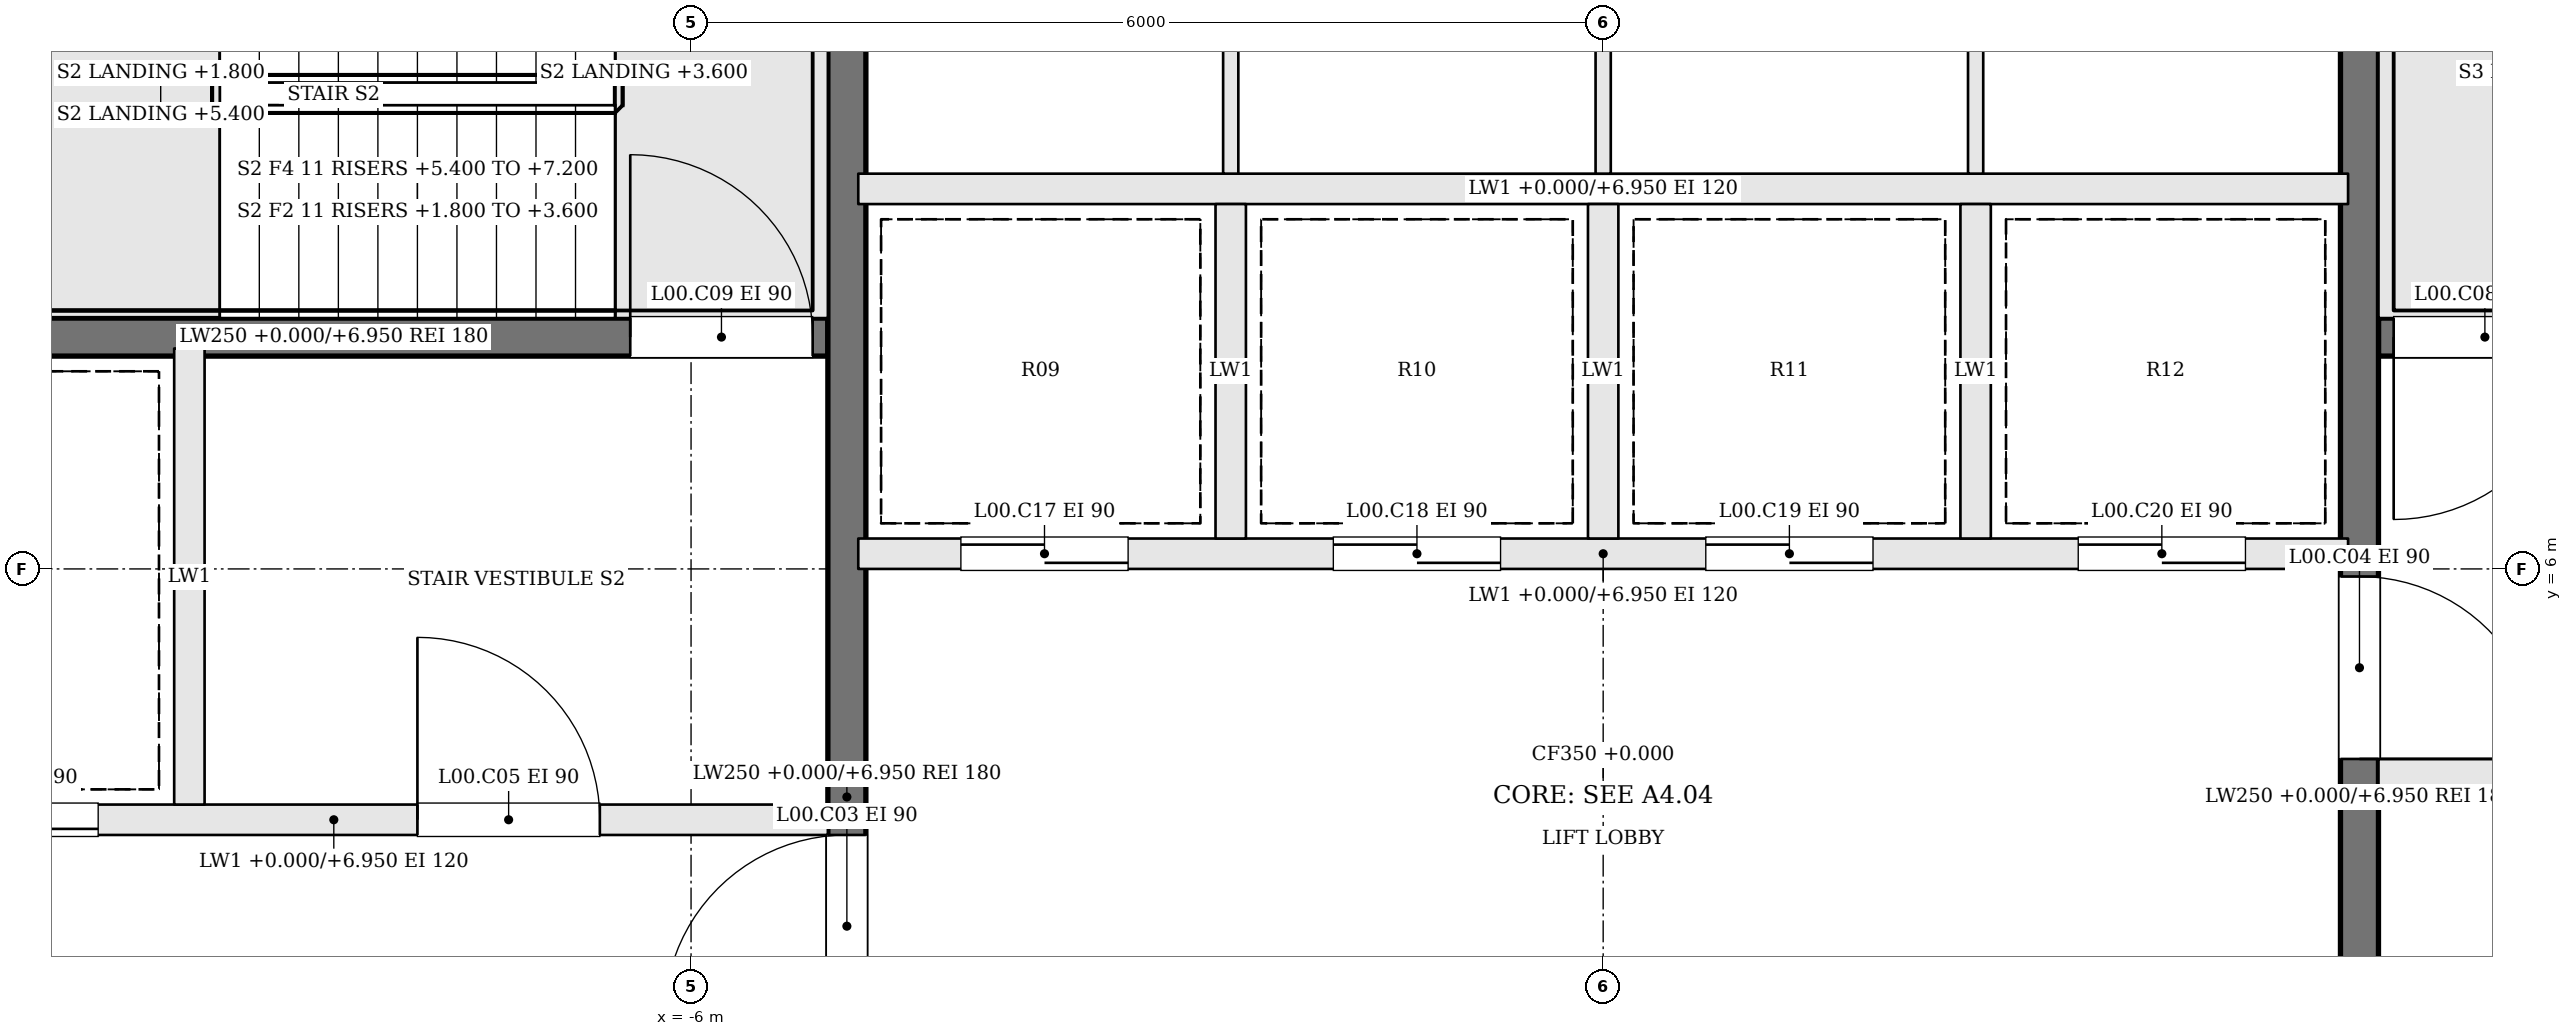
"""IFC4 building model, lengths in metres.
Left out: names, types, materials, properties, quantities, classifications, styles, units other than length and angle.
Written with IfcOpenShell. Run it as: python <this file> out.ifc"""

import sys

from ifc_helpers import new_model, si_unit, direction, frame, frame_2d, origin, place, context, subcontext, project, spatial, rectangle, extrude, element, fill, save


model = new_model("IFC4")
c1 = context("Model", 3, precision=1e-05, world=origin(), true_north=direction((0.0, 1.0)))
c2 = subcontext(c1, "Body", "Model", "MODEL_VIEW")
j1 = project(units=[si_unit("LENGTHUNIT", "METRE"), si_unit("PLANEANGLEUNIT", "RADIAN")], contexts=[c1])
p1 = place(None, origin())
s1 = spatial("IfcSite", under=j1, at=p1, CompositionType="ELEMENT")
p2 = place(p1, origin())
s2 = spatial("IfcBuilding", under=s1, at=p2, CompositionType="ELEMENT")
p3 = place(p2, origin())
s3 = spatial("IfcBuildingStorey", under=s2, at=p3, CompositionType="ELEMENT", Elevation=0.0)
p4 = place(p3, frame((11.6, 7.525, 0.0), z_axis=(0.0, 0.0, 1.0), x_axis=(-1.0, 0.0, 0.0)))
e1 = element("IfcWall", 1, at=p4, inside=s3, PredefinedType="SOLIDWALL", context=c2, shape_type="SweptSolid", body=[
    extrude(rectangle(XDim=6.5, YDim=0.25, at=frame_2d((3.25, 0.0))), origin(), (0.0, 0.0, 1.0), 6.95),
])
p5 = place(p4, frame((5.2, 0.0, 0.0)))
e2 = element("IfcOpeningElement", 2, at=p5, cuts=e1, PredefinedType="OPENING", context=c2, shape_type="SweptSolid", body=[
    extrude(rectangle(XDim=1.2, YDim=2.1, at=frame_2d((0.6, 1.05))), frame((0.0, 0.135, 0.0), z_axis=(0.0, -1.0, 0.0), x_axis=(1.0, 0.0, 0.0)), (0.0, 0.0, 1.0), 0.27),
])
p6 = place(p3, frame((-11.6, 4.35, 0.0), z_axis=(0.0, 0.0, 1.0), x_axis=(1.0, 0.0, 0.0)))
e3 = element("IfcWall", 3, at=p6, inside=s3, PredefinedType="SOLIDWALL", context=c2, shape_type="SweptSolid", body=[
    extrude(rectangle(XDim=6.5, YDim=0.2, at=frame_2d((3.25, 0.0))), origin(), (0.0, 0.0, 1.0), 6.95),
])
p7 = place(p6, frame((3.8, 0.0, 0.0)))
e4 = element("IfcOpeningElement", 4, at=p7, cuts=e3, PredefinedType="OPENING", context=c2, shape_type="SweptSolid", body=[
    extrude(rectangle(XDim=1.2, YDim=2.1, at=frame_2d((0.6, 1.05))), frame((0.0, 0.11, 0.0), z_axis=(0.0, -1.0, 0.0), x_axis=(1.0, 0.0, 0.0)), (0.0, 0.0, 1.0), 0.22),
])
p8 = place(p6, frame((0.5, 0.0, 0.0)))
e5 = element("IfcOpeningElement", 5, at=p8, cuts=e3, PredefinedType="OPENING", context=c2, shape_type="SweptSolid", body=[
    extrude(rectangle(XDim=1.2, YDim=2.1, at=frame_2d((0.6, 1.05))), frame((0.0, 0.11, 0.0), z_axis=(0.0, -1.0, 0.0), x_axis=(1.0, 0.0, 0.0)), (0.0, 0.0, 1.0), 0.22),
])
p9 = place(p3, frame((11.6, 4.65, 0.0), z_axis=(0.0, 0.0, 1.0), x_axis=(-1.0, 0.0, 0.0)))
e6 = element("IfcWall", 6, at=p9, inside=s3, PredefinedType="SOLIDWALL", context=c2, shape_type="SweptSolid", body=[
    extrude(rectangle(XDim=6.5, YDim=0.2, at=frame_2d((3.25, 0.0))), origin(), (0.0, 0.0, 1.0), 6.95),
])
p10 = place(p9, frame((3.8, 0.0, 0.0)))
e7 = element("IfcOpeningElement", 7, at=p10, cuts=e6, PredefinedType="OPENING", context=c2, shape_type="SweptSolid", body=[
    extrude(rectangle(XDim=1.2, YDim=2.1, at=frame_2d((0.6, 1.05))), frame((0.0, 0.11, 0.0), z_axis=(0.0, -1.0, 0.0), x_axis=(1.0, 0.0, 0.0)), (0.0, 0.0, 1.0), 0.22),
])
p11 = place(p9, frame((0.5, 0.0, 0.0)))
e8 = element("IfcOpeningElement", 8, at=p11, cuts=e6, PredefinedType="OPENING", context=c2, shape_type="SweptSolid", body=[
    extrude(rectangle(XDim=1.2, YDim=2.1, at=frame_2d((0.6, 1.05))), frame((0.0, 0.11, 0.0), z_axis=(0.0, -1.0, 0.0), x_axis=(1.0, 0.0, 0.0)), (0.0, 0.0, 1.0), 0.22),
])
p12 = place(p3, frame((-11.6, 7.525, 0.0), z_axis=(0.0, 0.0, 1.0), x_axis=(1.0, 0.0, 0.0)))
e9 = element("IfcWall", 9, at=p12, inside=s3, PredefinedType="SOLIDWALL", context=c2, shape_type="SweptSolid", body=[
    extrude(rectangle(XDim=6.5, YDim=0.25, at=frame_2d((3.25, 0.0))), origin(), (0.0, 0.0, 1.0), 6.95),
])
p13 = place(p12, frame((5.2, 0.0, 0.0)))
e10 = element("IfcOpeningElement", 10, at=p13, cuts=e9, PredefinedType="OPENING", context=c2, shape_type="SweptSolid", body=[
    extrude(rectangle(XDim=1.2, YDim=2.1, at=frame_2d((0.6, 1.05))), frame((0.0, 0.135, 0.0), z_axis=(0.0, -1.0, 0.0), x_axis=(1.0, 0.0, 0.0)), (0.0, 0.0, 1.0), 0.27),
])
p14 = place(p3, frame((-9.3, 4.45, 0.0), z_axis=(0.0, 0.0, 1.0), x_axis=(0.0, 1.0, 0.0)))
e11 = element("IfcWall", 11, at=p14, inside=s3, PredefinedType="SOLIDWALL", context=c2, shape_type="SweptSolid", body=[
    extrude(rectangle(XDim=3.0, YDim=0.2, at=frame_2d((1.5, 0.0))), origin(), (0.0, 0.0, 1.0), 6.95),
])
p15 = place(p3, frame((-4.975, -1.6, 0.0), z_axis=(0.0, 0.0, 1.0), x_axis=(0.0, 1.0, 0.0)))
e12 = element("IfcWall", 12, at=p15, inside=s3, PredefinedType="SOLIDWALL", context=c2, shape_type="SweptSolid", body=[
    extrude(rectangle(XDim=12.2, YDim=0.25, at=frame_2d((6.1, 0.0))), origin(), (0.0, 0.0, 1.0), 6.95),
])
p16 = place(p15, frame((4.65, 0.0, 0.0)))
e13 = element("IfcOpeningElement", 13, at=p16, cuts=e12, PredefinedType="OPENING", context=c2, shape_type="SweptSolid", body=[
    extrude(rectangle(XDim=1.2, YDim=2.1, at=frame_2d((0.6, 1.05))), frame((0.0, 0.135, 0.0), z_axis=(0.0, -1.0, 0.0), x_axis=(1.0, 0.0, 0.0)), (0.0, 0.0, 1.0), 0.27),
])
p17 = place(p3, frame((4.975, 10.6, 0.0), z_axis=(0.0, 0.0, 1.0), x_axis=(0.0, -1.0, 0.0)))
e14 = element("IfcWall", 14, at=p17, inside=s3, PredefinedType="SOLIDWALL", context=c2, shape_type="SweptSolid", body=[
    extrude(rectangle(XDim=12.2, YDim=0.25, at=frame_2d((6.1, 0.0))), origin(), (0.0, 0.0, 1.0), 6.95),
])
p18 = place(p17, frame((4.65, 0.0, 0.0)))
e15 = element("IfcOpeningElement", 15, at=p18, cuts=e14, PredefinedType="OPENING", context=c2, shape_type="SweptSolid", body=[
    extrude(rectangle(XDim=1.2, YDim=2.1, at=frame_2d((0.6, 1.05))), frame((0.0, 0.135, 0.0), z_axis=(0.0, -1.0, 0.0), x_axis=(1.0, 0.0, 0.0)), (0.0, 0.0, 1.0), 0.27),
])
p19 = place(p3, frame((-4.9, 6.1, 0.0), z_axis=(0.0, 0.0, 1.0), x_axis=(1.0, 0.0, 0.0)))
e16 = element("IfcWall", 16, at=p19, inside=s3, PredefinedType="SOLIDWALL", context=c2, shape_type="SweptSolid", body=[
    extrude(rectangle(XDim=9.8, YDim=0.2, at=frame_2d((4.9, 0.0))), origin(), (0.0, 0.0, 1.0), 6.95),
])
p20 = place(p19, frame((0.675, 0.0, 0.0)))
e17 = element("IfcOpeningElement", 17, at=p20, cuts=e16, PredefinedType="OPENING", context=c2, shape_type="SweptSolid", body=[
    extrude(rectangle(XDim=1.1, YDim=2.1, at=frame_2d((0.55, 1.05))), frame((0.0, 0.11, 0.0), z_axis=(0.0, -1.0, 0.0), x_axis=(1.0, 0.0, 0.0)), (0.0, 0.0, 1.0), 0.22),
])
p21 = place(p19, frame((3.125, 0.0, 0.0)))
e18 = element("IfcOpeningElement", 18, at=p21, cuts=e16, PredefinedType="OPENING", context=c2, shape_type="SweptSolid", body=[
    extrude(rectangle(XDim=1.1, YDim=2.1, at=frame_2d((0.55, 1.05))), frame((0.0, 0.11, 0.0), z_axis=(0.0, -1.0, 0.0), x_axis=(1.0, 0.0, 0.0)), (0.0, 0.0, 1.0), 0.22),
])
p22 = place(p19, frame((5.575, 0.0, 0.0)))
e19 = element("IfcOpeningElement", 19, at=p22, cuts=e16, PredefinedType="OPENING", context=c2, shape_type="SweptSolid", body=[
    extrude(rectangle(XDim=1.1, YDim=2.1, at=frame_2d((0.55, 1.05))), frame((0.0, 0.11, 0.0), z_axis=(0.0, -1.0, 0.0), x_axis=(1.0, 0.0, 0.0)), (0.0, 0.0, 1.0), 0.22),
])
p23 = place(p19, frame((8.025, 0.0, 0.0)))
e20 = element("IfcOpeningElement", 20, at=p23, cuts=e16, PredefinedType="OPENING", context=c2, shape_type="SweptSolid", body=[
    extrude(rectangle(XDim=1.1, YDim=2.1, at=frame_2d((0.55, 1.05))), frame((0.0, 0.11, 0.0), z_axis=(0.0, -1.0, 0.0), x_axis=(1.0, 0.0, 0.0)), (0.0, 0.0, 1.0), 0.22),
])
p24 = place(p3, frame((-4.9, 8.5, 0.0), z_axis=(0.0, 0.0, 1.0), x_axis=(1.0, 0.0, 0.0)))
e21 = element("IfcWall", 21, at=p24, inside=s3, PredefinedType="SOLIDWALL", context=c2, shape_type="SweptSolid", body=[
    extrude(rectangle(XDim=9.8, YDim=0.2, at=frame_2d((4.9, 0.0))), origin(), (0.0, 0.0, 1.0), 6.95),
])
for number, where, z_axis, x_axis in (
    (22, (-2.45, 6.2, 0.0), (0.0, 0.0, 1.0), (0.0, 1.0, 0.0)),
    (23, (0.0, 6.2, 0.0), (0.0, 0.0, 1.0), (0.0, 1.0, 0.0)),
    (24, (2.45, 6.2, 0.0), (0.0, 0.0, 1.0), (0.0, 1.0, 0.0)),
):
    element("IfcWall", number, at=place(p3, frame(where, z_axis=z_axis, x_axis=x_axis)), inside=s3, PredefinedType="SOLIDWALL", context=c2, shape_type="SweptSolid", body=[
        extrude(rectangle(XDim=2.2, YDim=0.2, at=frame_2d((1.1, 0.0))), origin(), (0.0, 0.0, 1.0), 6.95),
    ])
for number, where, z_axis, x_axis in (
    (25, (-2.45, 8.6, 0.0), (0.0, 0.0, 1.0), (0.0, 1.0, 0.0)),
    (26, (0.0, 8.6, 0.0), (0.0, 0.0, 1.0), (0.0, 1.0, 0.0)),
    (27, (2.45, 8.6, 0.0), (0.0, 0.0, 1.0), (0.0, 1.0, 0.0)),
):
    element("IfcWall", number, at=place(p3, frame(where, z_axis=z_axis, x_axis=x_axis)), inside=s3, PredefinedType="PARTITIONING", context=c2, shape_type="SweptSolid", body=[
        extrude(rectangle(XDim=2.0, YDim=0.1, at=frame_2d((1.0, 0.0))), origin(), (0.0, 0.0, 1.0), 6.95),
    ])
p25 = place(p16, origin())
e28 = element("IfcDoor", 28, at=p25, inside=s3, OperationType="SINGLE_SWING_LEFT", PredefinedType="DOOR", context=c2, shape_type="SweptSolid", body=[
    extrude(rectangle(XDim=1.2, YDim=2.1, at=frame_2d((0.6, 1.05))), frame((0.0, 0.025, 0.0), z_axis=(0.0, -1.0, 0.0), x_axis=(1.0, 0.0, 0.0)), (0.0, 0.0, 1.0), 0.05),
])
fill(e13, e28)
p26 = place(p18, origin())
e29 = element("IfcDoor", 29, at=p26, inside=s3, OperationType="SINGLE_SWING_RIGHT", PredefinedType="DOOR", context=c2, shape_type="SweptSolid", body=[
    extrude(rectangle(XDim=1.2, YDim=2.1, at=frame_2d((0.6, 1.05))), frame((0.0, 0.025, 0.0), z_axis=(0.0, -1.0, 0.0), x_axis=(1.0, 0.0, 0.0)), (0.0, 0.0, 1.0), 0.05),
])
fill(e15, e29)
p27 = place(p7, origin())
e30 = element("IfcDoor", 30, at=p27, inside=s3, OperationType="SINGLE_SWING_LEFT", PredefinedType="DOOR", context=c2, shape_type="SweptSolid", body=[
    extrude(rectangle(XDim=1.2, YDim=2.1, at=frame_2d((0.6, 1.05))), frame((0.0, 0.025, 0.0), z_axis=(0.0, -1.0, 0.0), x_axis=(1.0, 0.0, 0.0)), (0.0, 0.0, 1.0), 0.05),
])
fill(e4, e30)
p28 = place(p5, origin())
e31 = element("IfcDoor", 31, at=p28, inside=s3, OperationType="SINGLE_SWING_RIGHT", PredefinedType="DOOR", context=c2, shape_type="SweptSolid", body=[
    extrude(rectangle(XDim=1.2, YDim=2.1, at=frame_2d((0.6, 1.05))), frame((0.0, 0.025, 0.0), z_axis=(0.0, -1.0, 0.0), x_axis=(1.0, 0.0, 0.0)), (0.0, 0.0, 1.0), 0.05),
])
fill(e2, e31)
p29 = place(p13, origin())
e32 = element("IfcDoor", 32, at=p29, inside=s3, OperationType="SINGLE_SWING_LEFT", PredefinedType="DOOR", context=c2, shape_type="SweptSolid", body=[
    extrude(rectangle(XDim=1.2, YDim=2.1, at=frame_2d((0.6, 1.05))), frame((0.0, 0.025, 0.0), z_axis=(0.0, -1.0, 0.0), x_axis=(1.0, 0.0, 0.0)), (0.0, 0.0, 1.0), 0.05),
])
fill(e10, e32)
p30 = place(p8, origin())
e33 = element("IfcDoor", 33, at=p30, inside=s3, OperationType="SLIDING_TO_RIGHT", PredefinedType="DOOR", context=c2, shape_type="SweptSolid", body=[
    extrude(rectangle(XDim=1.2, YDim=2.1, at=frame_2d((0.6, 1.05))), frame((0.0, 0.025, 0.0), z_axis=(0.0, -1.0, 0.0), x_axis=(1.0, 0.0, 0.0)), (0.0, 0.0, 1.0), 0.05),
])
fill(e5, e33)
p31 = place(p20, origin())
e34 = element("IfcDoor", 34, at=p31, inside=s3, OperationType="SLIDING_TO_RIGHT", PredefinedType="DOOR", context=c2, shape_type="SweptSolid", body=[
    extrude(rectangle(XDim=1.1, YDim=2.1, at=frame_2d((0.55, 1.05))), frame((0.0, 0.025, 0.0), z_axis=(0.0, -1.0, 0.0), x_axis=(1.0, 0.0, 0.0)), (0.0, 0.0, 1.0), 0.05),
])
fill(e17, e34)
p32 = place(p21, origin())
e35 = element("IfcDoor", 35, at=p32, inside=s3, OperationType="SLIDING_TO_LEFT", PredefinedType="DOOR", context=c2, shape_type="SweptSolid", body=[
    extrude(rectangle(XDim=1.1, YDim=2.1, at=frame_2d((0.55, 1.05))), frame((0.0, 0.025, 0.0), z_axis=(0.0, -1.0, 0.0), x_axis=(1.0, 0.0, 0.0)), (0.0, 0.0, 1.0), 0.05),
])
fill(e18, e35)
p33 = place(p22, origin())
e36 = element("IfcDoor", 36, at=p33, inside=s3, OperationType="SLIDING_TO_RIGHT", PredefinedType="DOOR", context=c2, shape_type="SweptSolid", body=[
    extrude(rectangle(XDim=1.1, YDim=2.1, at=frame_2d((0.55, 1.05))), frame((0.0, 0.025, 0.0), z_axis=(0.0, -1.0, 0.0), x_axis=(1.0, 0.0, 0.0)), (0.0, 0.0, 1.0), 0.05),
])
fill(e19, e36)
p34 = place(p23, origin())
e37 = element("IfcDoor", 37, at=p34, inside=s3, OperationType="SLIDING_TO_LEFT", PredefinedType="DOOR", context=c2, shape_type="SweptSolid", body=[
    extrude(rectangle(XDim=1.1, YDim=2.1, at=frame_2d((0.55, 1.05))), frame((0.0, 0.025, 0.0), z_axis=(0.0, -1.0, 0.0), x_axis=(1.0, 0.0, 0.0)), (0.0, 0.0, 1.0), 0.05),
])
fill(e20, e37)
save(model, sys.argv[1])
